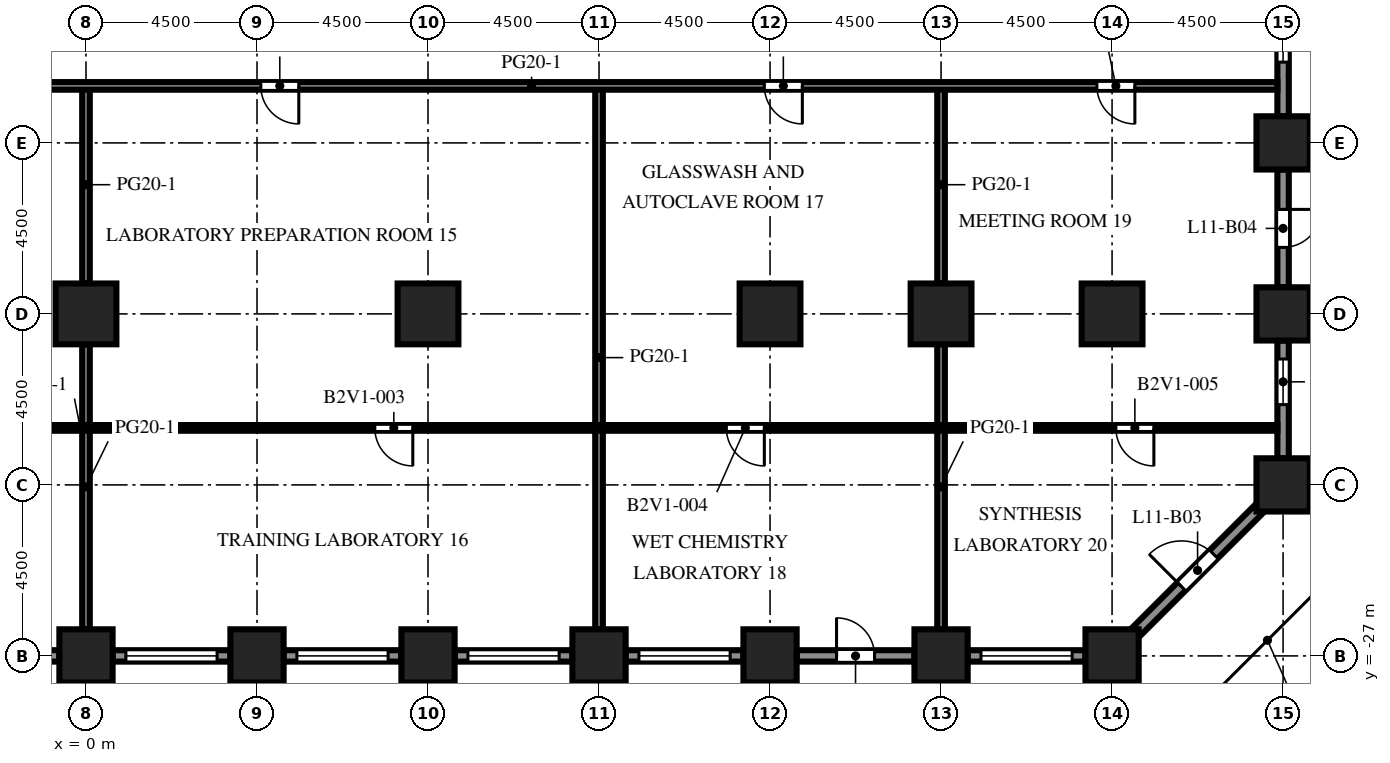
"""IFC4 building model, lengths in metres.
Left out: names, types, materials, properties, quantities, classifications, styles, units other than length and angle.
Written with IfcOpenShell. Run it as: python <this file> out.ifc"""

import sys

from ifc_helpers import new_model, si_unit, direction, frame, frame_2d, origin, origin_2d, place, context, subcontext, project, spatial, rectangle, extrude, element, fill, save


model = new_model("IFC4")
c1 = context("Model", 3, precision=1e-05, world=origin(), true_north=direction((0.0, 1.0)))
c2 = subcontext(c1, "Body", "Model", "MODEL_VIEW")
j1 = project(units=[si_unit("LENGTHUNIT", "METRE"), si_unit("PLANEANGLEUNIT", "RADIAN")], contexts=[c1])
p1 = place(None, origin())
s1 = spatial("IfcSite", under=j1, at=p1, CompositionType="ELEMENT")
p2 = place(p1, origin())
s2 = spatial("IfcBuilding", under=s1, at=p2, CompositionType="ELEMENT")
p3 = place(p2, frame((0.0, 0.0, 50.1)))
s3 = spatial("IfcBuildingStorey", under=s2, at=p3, CompositionType="ELEMENT", Elevation=50.1)
for number, where, z_axis, x_axis in (
    (1, (0.0, -27.0, 0.0), (0.0, 0.0, 1.0), (1.0, 0.0, 0.0)),
    (2, (4.5, -27.0, 0.0), (0.0, 0.0, 1.0), (1.0, 0.0, 0.0)),
    (3, (9.0, -27.0, 0.0), (0.0, 0.0, 1.0), (1.0, 0.0, 0.0)),
    (4, (13.5, -27.0, 0.0), (0.0, 0.0, 1.0), (1.0, 0.0, 0.0)),
    (5, (18.0, -27.0, 0.0), (0.0, 0.0, 1.0), (1.0, 0.0, 0.0)),
    (6, (22.5, -27.0, 0.0), (0.0, 0.0, 1.0), (1.0, 0.0, 0.0)),
    (7, (27.0, -27.0, 0.0), (0.0, 0.0, 1.0), (1.0, 0.0, 0.0)),
    (8, (31.5, -22.5, 0.0), (0.0, 0.0, 1.0), (1.0, 0.0, 0.0)),
    (9, (31.5, -18.0, 0.0), (0.0, 0.0, 1.0), (1.0, 0.0, 0.0)),
    (10, (31.5, -13.5, 0.0), (0.0, 0.0, 1.0), (1.0, 0.0, 0.0)),
):
    element("IfcColumn", number, at=place(p3, frame(where, z_axis=z_axis, x_axis=x_axis)), inside=s3, PredefinedType="COLUMN", context=c2, shape_type="SweptSolid", body=[
        extrude(rectangle(XDim=1.4, YDim=1.4, at=origin_2d()), origin(), (0.0, 0.0, 1.0), 4.1),
    ])
for number, where, z_axis, x_axis in (
    (11, (0.0, -18.0, 0.0), (0.0, 0.0, 1.0), (1.0, 0.0, 0.0)),
    (12, (9.0, -18.0, 0.0), (0.0, 0.0, 1.0), (1.0, 0.0, 0.0)),
    (13, (18.0, -18.0, 0.0), (0.0, 0.0, 1.0), (1.0, 0.0, 0.0)),
    (14, (22.5, -18.0, 0.0), (0.0, 0.0, 1.0), (1.0, 0.0, 0.0)),
    (15, (27.0, -18.0, 0.0), (0.0, 0.0, 1.0), (1.0, 0.0, 0.0)),
):
    element("IfcColumn", number, at=place(p3, frame(where, z_axis=z_axis, x_axis=x_axis)), inside=s3, PredefinedType="COLUMN", context=c2, shape_type="SweptSolid", body=[
        extrude(rectangle(XDim=1.6, YDim=1.6, at=origin_2d()), origin(), (0.0, 0.0, 1.0), 4.1),
    ])
p4 = place(p3, frame((-0.7, -27.0, 0.0), z_axis=(0.0, 0.0, 1.0), x_axis=(-1.0, 0.0, 0.0)))
e16 = element("IfcWall", 16, at=p4, inside=s3, PredefinedType="SOLIDWALL", context=c2, shape_type="SweptSolid", body=[
    extrude(rectangle(XDim=3.1, YDim=0.3, at=frame_2d((1.55, 0.0))), origin(), (0.0, 0.0, 1.0), 2.75),
])
p5 = place(p4, frame((0.35, 0.0, 0.8)))
e17 = element("IfcOpeningElement", 17, at=p5, cuts=e16, PredefinedType="OPENING", context=c2, shape_type="SweptSolid", body=[
    extrude(rectangle(XDim=2.4, YDim=1.7, at=frame_2d((1.2, 0.85))), frame((0.0, 0.16, 0.0), z_axis=(0.0, -1.0, 0.0), x_axis=(1.0, 0.0, 0.0)), (0.0, 0.0, 1.0), 0.32),
])
p6 = place(p3, frame((3.8, -27.0, 0.0), z_axis=(0.0, 0.0, 1.0), x_axis=(-1.0, 0.0, 0.0)))
e18 = element("IfcWall", 18, at=p6, inside=s3, PredefinedType="SOLIDWALL", context=c2, shape_type="SweptSolid", body=[
    extrude(rectangle(XDim=3.1, YDim=0.3, at=frame_2d((1.55, 0.0))), origin(), (0.0, 0.0, 1.0), 2.75),
])
p7 = place(p6, frame((0.35, 0.0, 0.8)))
e19 = element("IfcOpeningElement", 19, at=p7, cuts=e18, PredefinedType="OPENING", context=c2, shape_type="SweptSolid", body=[
    extrude(rectangle(XDim=2.4, YDim=1.7, at=frame_2d((1.2, 0.85))), frame((0.0, 0.16, 0.0), z_axis=(0.0, -1.0, 0.0), x_axis=(1.0, 0.0, 0.0)), (0.0, 0.0, 1.0), 0.32),
])
p8 = place(p3, frame((8.3, -27.0, 0.0), z_axis=(0.0, 0.0, 1.0), x_axis=(-1.0, 0.0, 0.0)))
e20 = element("IfcWall", 20, at=p8, inside=s3, PredefinedType="SOLIDWALL", context=c2, shape_type="SweptSolid", body=[
    extrude(rectangle(XDim=3.1, YDim=0.3, at=frame_2d((1.55, 0.0))), origin(), (0.0, 0.0, 1.0), 2.75),
])
p9 = place(p8, frame((0.35, 0.0, 0.8)))
e21 = element("IfcOpeningElement", 21, at=p9, cuts=e20, PredefinedType="OPENING", context=c2, shape_type="SweptSolid", body=[
    extrude(rectangle(XDim=2.4, YDim=1.7, at=frame_2d((1.2, 0.85))), frame((0.0, 0.16, 0.0), z_axis=(0.0, -1.0, 0.0), x_axis=(1.0, 0.0, 0.0)), (0.0, 0.0, 1.0), 0.32),
])
p10 = place(p3, frame((12.8, -27.0, 0.0), z_axis=(0.0, 0.0, 1.0), x_axis=(-1.0, 0.0, 0.0)))
e22 = element("IfcWall", 22, at=p10, inside=s3, PredefinedType="SOLIDWALL", context=c2, shape_type="SweptSolid", body=[
    extrude(rectangle(XDim=3.1, YDim=0.3, at=frame_2d((1.55, 0.0))), origin(), (0.0, 0.0, 1.0), 2.75),
])
p11 = place(p10, frame((0.35, 0.0, 0.8)))
e23 = element("IfcOpeningElement", 23, at=p11, cuts=e22, PredefinedType="OPENING", context=c2, shape_type="SweptSolid", body=[
    extrude(rectangle(XDim=2.4, YDim=1.7, at=frame_2d((1.2, 0.85))), frame((0.0, 0.16, 0.0), z_axis=(0.0, -1.0, 0.0), x_axis=(1.0, 0.0, 0.0)), (0.0, 0.0, 1.0), 0.32),
])
p12 = place(p3, frame((17.3, -27.0, 0.0), z_axis=(0.0, 0.0, 1.0), x_axis=(-1.0, 0.0, 0.0)))
e24 = element("IfcWall", 24, at=p12, inside=s3, PredefinedType="SOLIDWALL", context=c2, shape_type="SweptSolid", body=[
    extrude(rectangle(XDim=3.1, YDim=0.3, at=frame_2d((1.55, 0.0))), origin(), (0.0, 0.0, 1.0), 2.75),
])
p13 = place(p12, frame((0.35, 0.0, 0.8)))
e25 = element("IfcOpeningElement", 25, at=p13, cuts=e24, PredefinedType="OPENING", context=c2, shape_type="SweptSolid", body=[
    extrude(rectangle(XDim=2.4, YDim=1.7, at=frame_2d((1.2, 0.85))), frame((0.0, 0.16, 0.0), z_axis=(0.0, -1.0, 0.0), x_axis=(1.0, 0.0, 0.0)), (0.0, 0.0, 1.0), 0.32),
])
p14 = place(p3, frame((21.8, -27.0, 0.0), z_axis=(0.0, 0.0, 1.0), x_axis=(-1.0, 0.0, 0.0)))
e26 = element("IfcWall", 26, at=p14, inside=s3, PredefinedType="SOLIDWALL", context=c2, shape_type="SweptSolid", body=[
    extrude(rectangle(XDim=3.1, YDim=0.3, at=frame_2d((1.55, 0.0))), origin(), (0.0, 0.0, 1.0), 2.75),
])
p15 = place(p14, frame((1.05, 0.0, 0.0)))
e27 = element("IfcOpeningElement", 27, at=p15, cuts=e26, PredefinedType="OPENING", context=c2, shape_type="SweptSolid", body=[
    extrude(rectangle(XDim=1.0, YDim=2.2, at=frame_2d((0.5, 1.1))), frame((0.0, 0.16, 0.0), z_axis=(0.0, -1.0, 0.0), x_axis=(1.0, 0.0, 0.0)), (0.0, 0.0, 1.0), 0.32),
])
p16 = place(p3, frame((26.3, -27.0, 0.0), z_axis=(0.0, 0.0, 1.0), x_axis=(-1.0, 0.0, 0.0)))
e28 = element("IfcWall", 28, at=p16, inside=s3, PredefinedType="SOLIDWALL", context=c2, shape_type="SweptSolid", body=[
    extrude(rectangle(XDim=3.1, YDim=0.3, at=frame_2d((1.55, 0.0))), origin(), (0.0, 0.0, 1.0), 2.75),
])
p17 = place(p16, frame((0.35, 0.0, 0.8)))
e29 = element("IfcOpeningElement", 29, at=p17, cuts=e28, PredefinedType="OPENING", context=c2, shape_type="SweptSolid", body=[
    extrude(rectangle(XDim=2.4, YDim=1.7, at=frame_2d((1.2, 0.85))), frame((0.0, 0.16, 0.0), z_axis=(0.0, -1.0, 0.0), x_axis=(1.0, 0.0, 0.0)), (0.0, 0.0, 1.0), 0.32),
])
p18 = place(p3, frame((30.906, -23.094, 0.0), z_axis=(0.0, 0.0, 1.0), x_axis=(-0.707106781187, -0.707106781187, 0.0)))
e30 = element("IfcWall", 30, at=p18, inside=s3, PredefinedType="SOLIDWALL", context=c2, shape_type="SweptSolid", body=[
    extrude(rectangle(XDim=4.684, YDim=0.3, at=frame_2d((2.342, 0.0))), origin(), (0.0, 0.0, 1.0), 2.75),
])
p19 = place(p18, frame((1.742, 0.0, 0.0)))
e31 = element("IfcOpeningElement", 31, at=p19, cuts=e30, PredefinedType="OPENING", context=c2, shape_type="SweptSolid", body=[
    extrude(rectangle(XDim=1.2, YDim=2.2, at=frame_2d((0.6, 1.1))), frame((0.0, 0.16, 0.0), z_axis=(0.0, -1.0, 0.0), x_axis=(1.0, 0.0, 0.0)), (0.0, 0.0, 1.0), 0.32),
])
p20 = place(p3, frame((31.5, -18.7, 0.0), z_axis=(0.0, 0.0, 1.0), x_axis=(0.0, -1.0, 0.0)))
e32 = element("IfcWall", 32, at=p20, inside=s3, PredefinedType="SOLIDWALL", context=c2, shape_type="SweptSolid", body=[
    extrude(rectangle(XDim=3.1, YDim=0.3, at=frame_2d((1.55, 0.0))), origin(), (0.0, 0.0, 1.0), 2.75),
])
p21 = place(p20, frame((0.488, 0.0, 0.8)))
e33 = element("IfcOpeningElement", 33, at=p21, cuts=e32, PredefinedType="OPENING", context=c2, shape_type="SweptSolid", body=[
    extrude(rectangle(XDim=1.2, YDim=1.7, at=frame_2d((0.6, 0.85))), frame((0.0, 0.16, 0.0), z_axis=(0.0, -1.0, 0.0), x_axis=(1.0, 0.0, 0.0)), (0.0, 0.0, 1.0), 0.32),
])
p22 = place(p3, frame((31.5, -14.2, 0.0), z_axis=(0.0, 0.0, 1.0), x_axis=(0.0, -1.0, 0.0)))
e34 = element("IfcWall", 34, at=p22, inside=s3, PredefinedType="SOLIDWALL", context=c2, shape_type="SweptSolid", body=[
    extrude(rectangle(XDim=3.1, YDim=0.3, at=frame_2d((1.55, 0.0))), origin(), (0.0, 0.0, 1.0), 2.75),
])
p23 = place(p22, frame((1.05, 0.0, 0.0)))
e35 = element("IfcOpeningElement", 35, at=p23, cuts=e34, PredefinedType="OPENING", context=c2, shape_type="SweptSolid", body=[
    extrude(rectangle(XDim=1.0, YDim=2.2, at=frame_2d((0.5, 1.1))), frame((0.0, 0.16, 0.0), z_axis=(0.0, -1.0, 0.0), x_axis=(1.0, 0.0, 0.0)), (0.0, 0.0, 1.0), 0.32),
])
p24 = place(p3, frame((31.5, -9.7, 0.0), z_axis=(0.0, 0.0, 1.0), x_axis=(0.0, -1.0, 0.0)))
e36 = element("IfcWall", 36, at=p24, inside=s3, PredefinedType="SOLIDWALL", context=c2, shape_type="SweptSolid", body=[
    extrude(rectangle(XDim=3.1, YDim=0.3, at=frame_2d((1.55, 0.0))), origin(), (0.0, 0.0, 1.0), 2.75),
])
p25 = place(p24, frame((0.475, 0.0, 0.8)))
e37 = element("IfcOpeningElement", 37, at=p25, cuts=e36, PredefinedType="OPENING", context=c2, shape_type="SweptSolid", body=[
    extrude(rectangle(XDim=1.2, YDim=1.7, at=frame_2d((0.6, 0.85))), frame((0.0, 0.16, 0.0), z_axis=(0.0, -1.0, 0.0), x_axis=(1.0, 0.0, 0.0)), (0.0, 0.0, 1.0), 0.32),
])
p26 = place(p3, frame((0.0, -26.3, 0.0), z_axis=(0.0, 0.0, 1.0), x_axis=(0.0, 1.0, 0.0)))
e38 = element("IfcWall", 38, at=p26, inside=s3, PredefinedType="PARTITIONING", context=c2, shape_type="SweptSolid", body=[
    extrude(rectangle(XDim=7.5, YDim=0.2, at=frame_2d((3.75, 0.0))), origin(), (0.0, 0.0, 1.0), 3.65),
])
p27 = place(p3, frame((0.0, -17.2, 0.0), z_axis=(0.0, 0.0, 1.0), x_axis=(0.0, 1.0, 0.0)))
e39 = element("IfcWall", 39, at=p27, inside=s3, PredefinedType="PARTITIONING", context=c2, shape_type="SweptSolid", body=[
    extrude(rectangle(XDim=5.2, YDim=0.2, at=frame_2d((2.6, 0.0))), origin(), (0.0, 0.0, 1.0), 3.65),
])
p28 = place(p3, frame((13.5, -26.3, 0.0), z_axis=(0.0, 0.0, 1.0), x_axis=(0.0, 1.0, 0.0)))
e40 = element("IfcWall", 40, at=p28, inside=s3, PredefinedType="PARTITIONING", context=c2, shape_type="SweptSolid", body=[
    extrude(rectangle(XDim=14.3, YDim=0.2, at=frame_2d((7.15, 0.0))), origin(), (0.0, 0.0, 1.0), 3.65),
])
p29 = place(p3, frame((22.5, -26.3, 0.0), z_axis=(0.0, 0.0, 1.0), x_axis=(0.0, 1.0, 0.0)))
e41 = element("IfcWall", 41, at=p29, inside=s3, PredefinedType="PARTITIONING", context=c2, shape_type="SweptSolid", body=[
    extrude(rectangle(XDim=7.5, YDim=0.2, at=frame_2d((3.75, 0.0))), origin(), (0.0, 0.0, 1.0), 3.65),
])
p30 = place(p3, frame((22.5, -17.2, 0.0), z_axis=(0.0, 0.0, 1.0), x_axis=(0.0, 1.0, 0.0)))
e42 = element("IfcWall", 42, at=p30, inside=s3, PredefinedType="PARTITIONING", context=c2, shape_type="SweptSolid", body=[
    extrude(rectangle(XDim=5.2, YDim=0.2, at=frame_2d((2.6, 0.0))), origin(), (0.0, 0.0, 1.0), 3.65),
])
p31 = place(p3, frame((31.35, -21.0, 0.0), z_axis=(0.0, 0.0, 1.0), x_axis=(-1.0, 0.0, 0.0)))
e43 = element("IfcWall", 43, at=p31, inside=s3, PredefinedType="PARTITIONING", context=c2, shape_type="SweptSolid", body=[
    extrude(rectangle(XDim=53.7, YDim=0.15, at=frame_2d((26.85, 0.0))), origin(), (0.0, 0.0, 1.0), 3.65),
])
p32 = place(p31, frame((48.5, 0.0, 0.0)))
e44 = element("IfcOpeningElement", 44, at=p32, cuts=e43, PredefinedType="OPENING", context=c2, shape_type="SweptSolid", body=[
    extrude(rectangle(XDim=1.0, YDim=2.1, at=frame_2d((0.5, 1.05))), frame((0.0, 0.085, 0.0), z_axis=(0.0, -1.0, 0.0), x_axis=(1.0, 0.0, 0.0)), (0.0, 0.0, 1.0), 0.17),
])
p33 = place(p31, frame((39.25, 0.0, 0.0)))
e45 = element("IfcOpeningElement", 45, at=p33, cuts=e43, PredefinedType="OPENING", context=c2, shape_type="SweptSolid", body=[
    extrude(rectangle(XDim=1.0, YDim=2.1, at=frame_2d((0.5, 1.05))), frame((0.0, 0.085, 0.0), z_axis=(0.0, -1.0, 0.0), x_axis=(1.0, 0.0, 0.0)), (0.0, 0.0, 1.0), 0.17),
])
p34 = place(p31, frame((22.75, 0.0, 0.0)))
e46 = element("IfcOpeningElement", 46, at=p34, cuts=e43, PredefinedType="OPENING", context=c2, shape_type="SweptSolid", body=[
    extrude(rectangle(XDim=1.0, YDim=2.1, at=frame_2d((0.5, 1.05))), frame((0.0, 0.085, 0.0), z_axis=(0.0, -1.0, 0.0), x_axis=(1.0, 0.0, 0.0)), (0.0, 0.0, 1.0), 0.17),
])
p35 = place(p31, frame((13.5, 0.0, 0.0)))
e47 = element("IfcOpeningElement", 47, at=p35, cuts=e43, PredefinedType="OPENING", context=c2, shape_type="SweptSolid", body=[
    extrude(rectangle(XDim=1.0, YDim=2.1, at=frame_2d((0.5, 1.05))), frame((0.0, 0.085, 0.0), z_axis=(0.0, -1.0, 0.0), x_axis=(1.0, 0.0, 0.0)), (0.0, 0.0, 1.0), 0.17),
])
p36 = place(p31, frame((3.25, 0.0, 0.0)))
e48 = element("IfcOpeningElement", 48, at=p36, cuts=e43, PredefinedType="OPENING", context=c2, shape_type="SweptSolid", body=[
    extrude(rectangle(XDim=1.0, YDim=2.1, at=frame_2d((0.5, 1.05))), frame((0.0, 0.085, 0.0), z_axis=(0.0, -1.0, 0.0), x_axis=(1.0, 0.0, 0.0)), (0.0, 0.0, 1.0), 0.17),
])
p37 = place(p3, frame((31.35, -12.0, 0.0), z_axis=(0.0, 0.0, 1.0), x_axis=(-1.0, 0.0, 0.0)))
e49 = element("IfcWall", 49, at=p37, inside=s3, PredefinedType="PARTITIONING", context=c2, shape_type="SweptSolid", body=[
    extrude(rectangle(XDim=53.7, YDim=0.2, at=frame_2d((26.85, 0.0))), origin(), (0.0, 0.0, 1.0), 3.65),
])
p38 = place(p37, frame((48.25, 0.0, 0.0)))
e50 = element("IfcOpeningElement", 50, at=p38, cuts=e49, PredefinedType="OPENING", context=c2, shape_type="SweptSolid", body=[
    extrude(rectangle(XDim=1.0, YDim=2.1, at=frame_2d((0.5, 1.05))), frame((0.0, 0.11, 0.0), z_axis=(0.0, -1.0, 0.0), x_axis=(1.0, 0.0, 0.0)), (0.0, 0.0, 1.0), 0.22),
])
p39 = place(p37, frame((36.0, 0.0, 0.0)))
e51 = element("IfcOpeningElement", 51, at=p39, cuts=e49, PredefinedType="OPENING", context=c2, shape_type="SweptSolid", body=[
    extrude(rectangle(XDim=1.0, YDim=2.1, at=frame_2d((0.5, 1.05))), frame((0.0, 0.11, 0.0), z_axis=(0.0, -1.0, 0.0), x_axis=(1.0, 0.0, 0.0)), (0.0, 0.0, 1.0), 0.22),
])
p40 = place(p37, frame((25.75, 0.0, 0.0)))
e52 = element("IfcOpeningElement", 52, at=p40, cuts=e49, PredefinedType="OPENING", context=c2, shape_type="SweptSolid", body=[
    extrude(rectangle(XDim=1.0, YDim=2.1, at=frame_2d((0.5, 1.05))), frame((0.0, 0.11, 0.0), z_axis=(0.0, -1.0, 0.0), x_axis=(1.0, 0.0, 0.0)), (0.0, 0.0, 1.0), 0.22),
])
p41 = place(p37, frame((12.5, 0.0, 0.0)))
e53 = element("IfcOpeningElement", 53, at=p41, cuts=e49, PredefinedType="OPENING", context=c2, shape_type="SweptSolid", body=[
    extrude(rectangle(XDim=1.0, YDim=2.1, at=frame_2d((0.5, 1.05))), frame((0.0, 0.11, 0.0), z_axis=(0.0, -1.0, 0.0), x_axis=(1.0, 0.0, 0.0)), (0.0, 0.0, 1.0), 0.22),
])
p42 = place(p37, frame((3.75, 0.0, 0.0)))
e54 = element("IfcOpeningElement", 54, at=p42, cuts=e49, PredefinedType="OPENING", context=c2, shape_type="SweptSolid", body=[
    extrude(rectangle(XDim=1.0, YDim=2.1, at=frame_2d((0.5, 1.05))), frame((0.0, 0.11, 0.0), z_axis=(0.0, -1.0, 0.0), x_axis=(1.0, 0.0, 0.0)), (0.0, 0.0, 1.0), 0.22),
])
p43 = place(p7, origin())
e55 = element("IfcWindow", 55, at=p43, inside=s3, PartitioningType="SINGLE_PANEL", PredefinedType="WINDOW", context=c2, shape_type="SweptSolid", body=[
    extrude(rectangle(XDim=2.4, YDim=1.7, at=frame_2d((1.2, 0.85))), frame((0.0, 0.03, 0.0), z_axis=(0.0, -1.0, 0.0), x_axis=(1.0, 0.0, 0.0)), (0.0, 0.0, 1.0), 0.06),
])
fill(e19, e55)
p44 = place(p9, origin())
e56 = element("IfcWindow", 56, at=p44, inside=s3, PartitioningType="SINGLE_PANEL", PredefinedType="WINDOW", context=c2, shape_type="SweptSolid", body=[
    extrude(rectangle(XDim=2.4, YDim=1.7, at=frame_2d((1.2, 0.85))), frame((0.0, 0.03, 0.0), z_axis=(0.0, -1.0, 0.0), x_axis=(1.0, 0.0, 0.0)), (0.0, 0.0, 1.0), 0.06),
])
fill(e21, e56)
p45 = place(p11, origin())
e57 = element("IfcWindow", 57, at=p45, inside=s3, PartitioningType="SINGLE_PANEL", PredefinedType="WINDOW", context=c2, shape_type="SweptSolid", body=[
    extrude(rectangle(XDim=2.4, YDim=1.7, at=frame_2d((1.2, 0.85))), frame((0.0, 0.03, 0.0), z_axis=(0.0, -1.0, 0.0), x_axis=(1.0, 0.0, 0.0)), (0.0, 0.0, 1.0), 0.06),
])
fill(e23, e57)
p46 = place(p13, origin())
e58 = element("IfcWindow", 58, at=p46, inside=s3, PartitioningType="SINGLE_PANEL", PredefinedType="WINDOW", context=c2, shape_type="SweptSolid", body=[
    extrude(rectangle(XDim=2.4, YDim=1.7, at=frame_2d((1.2, 0.85))), frame((0.0, 0.03, 0.0), z_axis=(0.0, -1.0, 0.0), x_axis=(1.0, 0.0, 0.0)), (0.0, 0.0, 1.0), 0.06),
])
fill(e25, e58)
p47 = place(p15, origin())
e59 = element("IfcDoor", 59, at=p47, inside=s3, OperationType="SINGLE_SWING_RIGHT", PredefinedType="DOOR", context=c2, shape_type="SweptSolid", body=[
    extrude(rectangle(XDim=1.0, YDim=2.2, at=frame_2d((0.5, 1.1))), frame((0.0, 0.025, 0.0), z_axis=(0.0, -1.0, 0.0), x_axis=(1.0, 0.0, 0.0)), (0.0, 0.0, 1.0), 0.05),
])
fill(e27, e59)
p48 = place(p17, origin())
e60 = element("IfcWindow", 60, at=p48, inside=s3, PartitioningType="SINGLE_PANEL", PredefinedType="WINDOW", context=c2, shape_type="SweptSolid", body=[
    extrude(rectangle(XDim=2.4, YDim=1.7, at=frame_2d((1.2, 0.85))), frame((0.0, 0.03, 0.0), z_axis=(0.0, -1.0, 0.0), x_axis=(1.0, 0.0, 0.0)), (0.0, 0.0, 1.0), 0.06),
])
fill(e29, e60)
p49 = place(p19, origin())
e61 = element("IfcDoor", 61, at=p49, inside=s3, OperationType="SINGLE_SWING_RIGHT", PredefinedType="DOOR", context=c2, shape_type="SweptSolid", body=[
    extrude(rectangle(XDim=1.2, YDim=2.2, at=frame_2d((0.6, 1.1))), frame((0.0, 0.025, 0.0), z_axis=(0.0, -1.0, 0.0), x_axis=(1.0, 0.0, 0.0)), (0.0, 0.0, 1.0), 0.05),
])
fill(e31, e61)
p50 = place(p21, origin())
e62 = element("IfcWindow", 62, at=p50, inside=s3, PartitioningType="SINGLE_PANEL", PredefinedType="WINDOW", context=c2, shape_type="SweptSolid", body=[
    extrude(rectangle(XDim=1.2, YDim=1.7, at=frame_2d((0.6, 0.85))), frame((0.0, 0.03, 0.0), z_axis=(0.0, -1.0, 0.0), x_axis=(1.0, 0.0, 0.0)), (0.0, 0.0, 1.0), 0.06),
])
fill(e33, e62)
p51 = place(p23, origin())
e63 = element("IfcDoor", 63, at=p51, inside=s3, OperationType="SINGLE_SWING_LEFT", PredefinedType="DOOR", context=c2, shape_type="SweptSolid", body=[
    extrude(rectangle(XDim=1.0, YDim=2.2, at=frame_2d((0.5, 1.1))), frame((0.0, 0.025, 0.0), z_axis=(0.0, -1.0, 0.0), x_axis=(1.0, 0.0, 0.0)), (0.0, 0.0, 1.0), 0.05),
])
fill(e35, e63)
p52 = place(p25, origin())
e64 = element("IfcWindow", 64, at=p52, inside=s3, PartitioningType="SINGLE_PANEL", PredefinedType="WINDOW", context=c2, shape_type="SweptSolid", body=[
    extrude(rectangle(XDim=1.2, YDim=1.7, at=frame_2d((0.6, 0.85))), frame((0.0, 0.03, 0.0), z_axis=(0.0, -1.0, 0.0), x_axis=(1.0, 0.0, 0.0)), (0.0, 0.0, 1.0), 0.06),
])
fill(e37, e64)
p53 = place(p34, origin())
e65 = element("IfcDoor", 65, at=p53, inside=s3, OperationType="SINGLE_SWING_LEFT", PredefinedType="DOOR", context=c2, shape_type="SweptSolid", body=[
    extrude(rectangle(XDim=1.0, YDim=2.1, at=frame_2d((0.5, 1.05))), frame((0.0, 0.025, 0.0), z_axis=(0.0, -1.0, 0.0), x_axis=(1.0, 0.0, 0.0)), (0.0, 0.0, 1.0), 0.05),
])
fill(e46, e65)
p54 = place(p35, origin())
e66 = element("IfcDoor", 66, at=p54, inside=s3, OperationType="SINGLE_SWING_LEFT", PredefinedType="DOOR", context=c2, shape_type="SweptSolid", body=[
    extrude(rectangle(XDim=1.0, YDim=2.1, at=frame_2d((0.5, 1.05))), frame((0.0, 0.025, 0.0), z_axis=(0.0, -1.0, 0.0), x_axis=(1.0, 0.0, 0.0)), (0.0, 0.0, 1.0), 0.05),
])
fill(e47, e66)
p55 = place(p36, origin())
e67 = element("IfcDoor", 67, at=p55, inside=s3, OperationType="SINGLE_SWING_LEFT", PredefinedType="DOOR", context=c2, shape_type="SweptSolid", body=[
    extrude(rectangle(XDim=1.0, YDim=2.1, at=frame_2d((0.5, 1.05))), frame((0.0, 0.025, 0.0), z_axis=(0.0, -1.0, 0.0), x_axis=(1.0, 0.0, 0.0)), (0.0, 0.0, 1.0), 0.05),
])
fill(e48, e67)
p56 = place(p40, origin())
e68 = element("IfcDoor", 68, at=p56, inside=s3, OperationType="SINGLE_SWING_LEFT", PredefinedType="DOOR", context=c2, shape_type="SweptSolid", body=[
    extrude(rectangle(XDim=1.0, YDim=2.1, at=frame_2d((0.5, 1.05))), frame((0.0, 0.025, 0.0), z_axis=(0.0, -1.0, 0.0), x_axis=(1.0, 0.0, 0.0)), (0.0, 0.0, 1.0), 0.05),
])
fill(e52, e68)
p57 = place(p41, origin())
e69 = element("IfcDoor", 69, at=p57, inside=s3, OperationType="SINGLE_SWING_LEFT", PredefinedType="DOOR", context=c2, shape_type="SweptSolid", body=[
    extrude(rectangle(XDim=1.0, YDim=2.1, at=frame_2d((0.5, 1.05))), frame((0.0, 0.025, 0.0), z_axis=(0.0, -1.0, 0.0), x_axis=(1.0, 0.0, 0.0)), (0.0, 0.0, 1.0), 0.05),
])
fill(e53, e69)
p58 = place(p42, origin())
e70 = element("IfcDoor", 70, at=p58, inside=s3, OperationType="SINGLE_SWING_LEFT", PredefinedType="DOOR", context=c2, shape_type="SweptSolid", body=[
    extrude(rectangle(XDim=1.0, YDim=2.1, at=frame_2d((0.5, 1.05))), frame((0.0, 0.025, 0.0), z_axis=(0.0, -1.0, 0.0), x_axis=(1.0, 0.0, 0.0)), (0.0, 0.0, 1.0), 0.05),
])
fill(e54, e70)
save(model, sys.argv[1])
